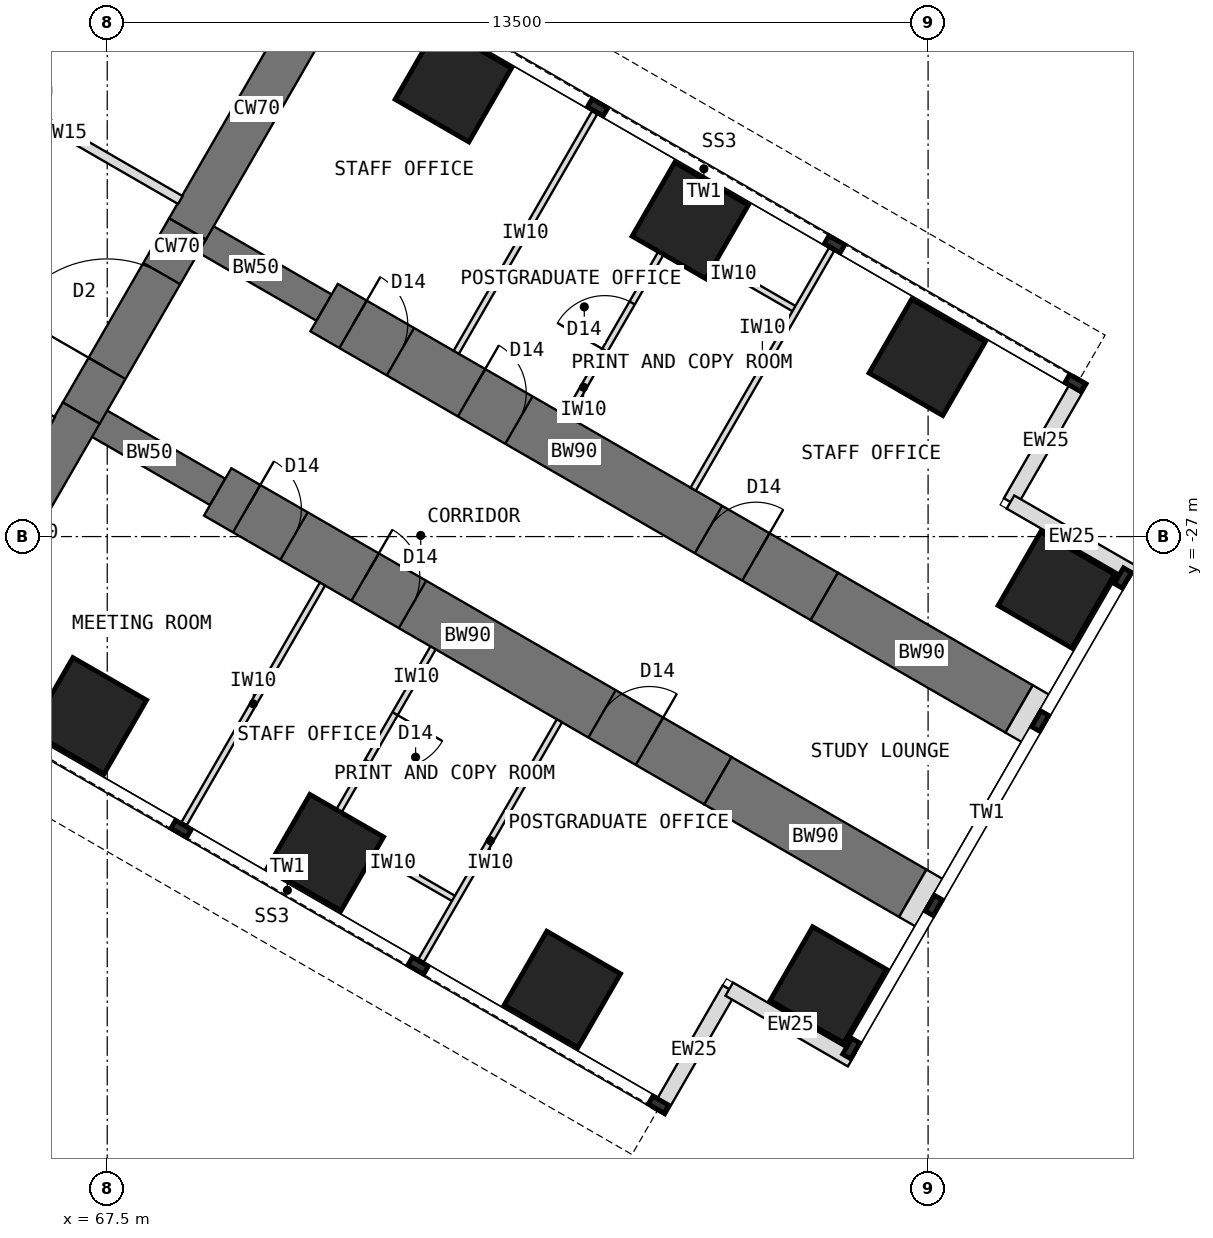
"""IFC4 building model, lengths in metres.
Left out: names, types, materials, properties, quantities, classifications, styles, units other than length and angle.
Written with IfcOpenShell. Run it as: python <this file> out.ifc"""

import sys

from ifc_helpers import new_model, si_unit, direction, frame, frame_2d, origin, origin_2d, place, context, subcontext, project, spatial, rectangle, extrude, element, fill, save


model = new_model("IFC4")
c1 = context("Model", 3, precision=1e-05, world=origin(), true_north=direction((0.0, 1.0)))
c2 = subcontext(c1, "Body", "Model", "MODEL_VIEW")
j1 = project(units=[si_unit("LENGTHUNIT", "METRE"), si_unit("PLANEANGLEUNIT", "RADIAN")], contexts=[c1])
p1 = place(None, origin())
s1 = spatial("IfcSite", under=j1, at=p1, CompositionType="ELEMENT")
p2 = place(p1, origin())
s2 = spatial("IfcBuilding", under=s1, at=p2, CompositionType="ELEMENT")
p3 = place(p2, frame((0.0, 0.0, 84.5)))
s3 = spatial("IfcBuildingStorey", under=s2, at=p3, CompositionType="ELEMENT", Elevation=84.5)
p4 = place(p3, frame((64.798, -28.908, 0.0), z_axis=(0.0, 0.0, 1.0), x_axis=(0.499984222037, 0.866034513004, 0.0)))
e1 = element("IfcWall", 1, at=p4, inside=s3, PredefinedType="SHEAR", context=c2, shape_type="SweptSolid", body=[
    extrude(rectangle(XDim=4.548, YDim=0.7, at=frame_2d((2.274, 0.0))), origin(), (0.0, 0.0, 1.0), 4.0),
])
p5 = place(p3, frame((67.072, -24.97, 0.0), z_axis=(0.0, 0.0, 1.0), x_axis=(0.500010275428, 0.866019471182, 0.0)))
e2 = element("IfcWall", 2, at=p5, inside=s3, PredefinedType="SHEAR", context=c2, shape_type="SweptSolid", body=[
    extrude(rectangle(XDim=3.5, YDim=0.7, at=frame_2d((1.75, 0.0))), origin(), (0.0, 0.0, 1.0), 4.0),
])
p6 = place(p5, frame((0.85, 0.0, 0.0)))
e3 = element("IfcOpeningElement", 3, at=p6, cuts=e2, PredefinedType="OPENING", context=c2, shape_type="SweptSolid", body=[
    extrude(rectangle(XDim=1.8, YDim=2.1, at=frame_2d((0.9, 1.05))), frame((0.0, 0.36, 0.0), z_axis=(0.0, -1.0, 0.0), x_axis=(1.0, 0.0, 0.0)), (0.0, 0.0, 1.0), 0.72),
])
p7 = place(p3, frame((68.822, -21.939, 0.0), z_axis=(0.0, 0.0, 1.0), x_axis=(0.500024481964, 0.866011268655, 0.0)))
e4 = element("IfcWall", 4, at=p7, inside=s3, PredefinedType="SHEAR", context=c2, shape_type="SweptSolid", body=[
    extrude(rectangle(XDim=4.548, YDim=0.7, at=frame_2d((2.274, 0.0))), origin(), (0.0, 0.0, 1.0), 4.0),
])
p8 = place(p3, frame((68.822, -21.939, 0.0), z_axis=(0.0, 0.0, 1.0), x_axis=(0.866072649678, -0.499918158782, 0.0)))
e5 = element("IfcWall", 5, at=p8, inside=s3, PredefinedType="SHEAR", context=c2, shape_type="SweptSolid", body=[
    extrude(rectangle(XDim=2.592, YDim=0.5, at=frame_2d((1.296, 0.0))), origin(), (0.0, 0.0, 1.0), 4.0),
])
p9 = place(p3, frame((71.066, -23.234, 0.0), z_axis=(0.0, 0.0, 1.0), x_axis=(0.86602681393, -0.499997557548, 0.0)))
e6 = element("IfcWall", 6, at=p9, inside=s3, PredefinedType="SHEAR", context=c2, shape_type="SweptSolid", body=[
    extrude(rectangle(XDim=9.5, YDim=0.9, at=frame_2d((4.75, 0.0))), origin(), (0.0, 0.0, 1.0), 4.0),
])
p10 = place(p9, frame((0.55, 0.0, 0.0)))
e7 = element("IfcOpeningElement", 7, at=p10, cuts=e6, PredefinedType="OPENING", context=c2, shape_type="SweptSolid", body=[
    extrude(rectangle(XDim=0.9, YDim=2.1, at=frame_2d((0.45, 1.05))), frame((0.0, 0.46, 0.0), z_axis=(0.0, -1.0, 0.0), x_axis=(1.0, 0.0, 0.0)), (0.0, 0.0, 1.0), 0.92),
])
p11 = place(p9, frame((2.8, 0.0, 0.0)))
e8 = element("IfcOpeningElement", 8, at=p11, cuts=e6, PredefinedType="OPENING", context=c2, shape_type="SweptSolid", body=[
    extrude(rectangle(XDim=0.9, YDim=2.1, at=frame_2d((0.45, 1.05))), frame((0.0, 0.46, 0.0), z_axis=(0.0, -1.0, 0.0), x_axis=(1.0, 0.0, 0.0)), (0.0, 0.0, 1.0), 0.92),
])
p12 = place(p9, frame((7.3, 0.0, 0.0)))
e9 = element("IfcOpeningElement", 9, at=p12, cuts=e6, PredefinedType="OPENING", context=c2, shape_type="SweptSolid", body=[
    extrude(rectangle(XDim=0.9, YDim=2.1, at=frame_2d((0.45, 1.05))), frame((0.0, 0.46, 0.0), z_axis=(0.0, -1.0, 0.0), x_axis=(1.0, 0.0, 0.0)), (0.0, 0.0, 1.0), 0.92),
])
p13 = place(p3, frame((79.294, -27.984, 0.0), z_axis=(0.0, 0.0, 1.0), x_axis=(0.866000971088, -0.500042316284, 0.0)))
e10 = element("IfcWall", 10, at=p13, inside=s3, PredefinedType="SHEAR", context=c2, shape_type="SweptSolid", body=[
    extrude(rectangle(XDim=3.7, YDim=0.9, at=frame_2d((1.85, 0.0))), origin(), (0.0, 0.0, 1.0), 4.0),
])
p14 = place(p3, frame((67.072, -24.97, 0.0), z_axis=(0.0, 0.0, 1.0), x_axis=(0.866031863473, -0.499988811324, 0.0)))
e11 = element("IfcWall", 11, at=p14, inside=s3, PredefinedType="SHEAR", context=c2, shape_type="SweptSolid", body=[
    extrude(rectangle(XDim=2.592, YDim=0.5, at=frame_2d((1.296, 0.0))), origin(), (0.0, 0.0, 1.0), 4.0),
])
p15 = place(p3, frame((69.316, -26.266, 0.0), z_axis=(0.0, 0.0, 1.0), x_axis=(0.86602681393, -0.499997557548, 0.0)))
e12 = element("IfcWall", 12, at=p15, inside=s3, PredefinedType="SHEAR", context=c2, shape_type="SweptSolid", body=[
    extrude(rectangle(XDim=9.5, YDim=0.9, at=frame_2d((4.75, 0.0))), origin(), (0.0, 0.0, 1.0), 4.0),
])
p16 = place(p15, frame((0.55, 0.0, 0.0)))
e13 = element("IfcOpeningElement", 13, at=p16, cuts=e12, PredefinedType="OPENING", context=c2, shape_type="SweptSolid", body=[
    extrude(rectangle(XDim=0.9, YDim=2.1, at=frame_2d((0.45, 1.05))), frame((0.0, 0.46, 0.0), z_axis=(0.0, -1.0, 0.0), x_axis=(1.0, 0.0, 0.0)), (0.0, 0.0, 1.0), 0.92),
])
p17 = place(p15, frame((2.8, 0.0, 0.0)))
e14 = element("IfcOpeningElement", 14, at=p17, cuts=e12, PredefinedType="OPENING", context=c2, shape_type="SweptSolid", body=[
    extrude(rectangle(XDim=0.9, YDim=2.1, at=frame_2d((0.45, 1.05))), frame((0.0, 0.46, 0.0), z_axis=(0.0, -1.0, 0.0), x_axis=(1.0, 0.0, 0.0)), (0.0, 0.0, 1.0), 0.92),
])
p18 = place(p15, frame((7.3, 0.0, 0.0)))
e15 = element("IfcOpeningElement", 15, at=p18, cuts=e12, PredefinedType="OPENING", context=c2, shape_type="SweptSolid", body=[
    extrude(rectangle(XDim=0.9, YDim=2.1, at=frame_2d((0.45, 1.05))), frame((0.0, 0.46, 0.0), z_axis=(0.0, -1.0, 0.0), x_axis=(1.0, 0.0, 0.0)), (0.0, 0.0, 1.0), 0.92),
])
p19 = place(p3, frame((77.544, -31.016, 0.0), z_axis=(0.0, 0.0, 1.0), x_axis=(0.866029545028, -0.499992827086, 0.0)))
e16 = element("IfcWall", 16, at=p19, inside=s3, PredefinedType="SHEAR", context=c2, shape_type="SweptSolid", body=[
    extrude(rectangle(XDim=3.7, YDim=0.9, at=frame_2d((1.85, 0.0))), origin(), (0.0, 0.0, 1.0), 4.0),
])
for number, where, z_axis, x_axis in (
    (17, (73.191, -19.554, 0.0), (0.0, 0.0, 1.0), (0.5, 0.866, 0.0)),
    (18, (67.191, -29.946, 0.0), (0.0, 0.0, 1.0), (0.5, 0.866, 0.0)),
    (19, (77.088, -21.804, 0.0), (0.0, 0.0, 1.0), (0.5, 0.866, 0.0)),
    (20, (71.088, -32.196, 0.0), (0.0, 0.0, 1.0), (0.5, 0.866, 0.0)),
    (21, (80.986, -24.054, 0.0), (0.0, 0.0, 1.0), (0.5, 0.866, 0.0)),
    (22, (74.986, -34.446, 0.0), (0.0, 0.0, 1.0), (0.5, 0.866, 0.0)),
    (23, (83.108, -27.877, 0.0), (0.0, 0.0, 1.0), (0.5, 0.866, 0.0)),
    (24, (79.358, -34.373, 0.0), (0.0, 0.0, 1.0), (0.5, 0.866, 0.0)),
):
    element("IfcColumn", number, at=place(p3, frame(where, z_axis=z_axis, x_axis=x_axis)), inside=s3, PredefinedType="COLUMN", context=c2, shape_type="SweptSolid", body=[
        extrude(rectangle(XDim=1.4, YDim=1.4, at=origin_2d()), origin(), (0.0, 0.0, 1.0), 4.0),
    ])
for number, where, z_axis, x_axis in (
    (25, (83.517, -24.419, 0.0), (0.0, 0.0, 1.0), (-0.5, -0.866, 0.0)),
    (26, (82.355, -26.432, 0.0), (0.0, 0.0, 1.0), (0.866, -0.5, 0.0)),
    (27, (76.567, -36.456, 0.0), (0.0, 0.0, 1.0), (0.5, 0.866, 0.0)),
    (28, (77.73, -34.443, 0.0), (0.0, 0.0, 1.0), (0.866, -0.5, 0.0)),
):
    element("IfcWall", number, at=place(p3, frame(where, z_axis=z_axis, x_axis=x_axis)), inside=s3, PredefinedType="STANDARD", context=c2, shape_type="SweptSolid", body=[
        extrude(rectangle(XDim=2.325, YDim=0.25, at=frame_2d((1.163, 0.0))), origin(), (0.0, 0.0, 1.0), 3.8),
    ])
for number, where, z_axis, x_axis in (
    (29, (82.498, -29.834, 0.0), (0.0, 0.0, 1.0), (0.866, -0.5, 0.0)),
    (30, (80.748, -32.865, 0.0), (0.0, 0.0, 1.0), (0.866, -0.5, 0.0)),
):
    element("IfcWall", number, at=place(p3, frame(where, z_axis=z_axis, x_axis=x_axis)), inside=s3, PredefinedType="PARTITIONING", context=c2, shape_type="SweptSolid", body=[
        extrude(rectangle(XDim=0.31, YDim=0.9, at=frame_2d((0.155, 0.0))), origin(), (0.0, 0.0, 1.0), 3.8),
    ])
p20 = place(p3, frame((64.62, -19.201, 0.0), z_axis=(0.0, 0.0, 1.0), x_axis=(0.866023886965, 0.500002627198, 0.0)))
e31 = element("IfcWall", 31, at=p20, inside=s3, PredefinedType="SHEAR", context=c2, shape_type="SweptSolid", body=[
    extrude(rectangle(XDim=5.858, YDim=0.4, at=frame_2d((2.929, 0.0))), origin(), (0.0, 0.0, 1.0), 4.0),
])
for number, where, z_axis, x_axis in (
    (32, (73.24, -23.97, 0.0), (0.0, 0.0, 1.0), (0.5, 0.866, 0.0)),
    (33, (77.137, -26.22, 0.0), (0.0, 0.0, 1.0), (0.5, 0.866, 0.0)),
):
    element("IfcWall", number, at=place(p3, frame(where, z_axis=z_axis, x_axis=x_axis)), inside=s3, PredefinedType="PARTITIONING", context=c2, shape_type="SweptSolid", body=[
        extrude(rectangle(XDim=4.55, YDim=0.1, at=frame_2d((2.275, 0.0))), origin(), (0.0, 0.0, 1.0), 3.8),
    ])
p21 = place(p3, frame((76.759, -22.075, 0.0), z_axis=(0.0, 0.0, 1.0), x_axis=(0.866024647952, -0.500001309137, 0.0)))
e34 = element("IfcWall", 34, at=p21, inside=s3, PredefinedType="PARTITIONING", context=c2, shape_type="SweptSolid", body=[
    extrude(rectangle(XDim=2.4, YDim=0.1, at=frame_2d((1.2, 0.0))), origin(), (0.0, 0.0, 1.0), 3.8),
])
p22 = place(p3, frame((75.059, -25.02, 0.0), z_axis=(0.0, 0.0, 1.0), x_axis=(0.499977295307, 0.866038511948, 0.0)))
e35 = element("IfcWall", 35, at=p22, inside=s3, PredefinedType="PARTITIONING", context=c2, shape_type="SweptSolid", body=[
    extrude(rectangle(XDim=3.4, YDim=0.1, at=frame_2d((1.7, 0.0))), origin(), (0.0, 0.0, 1.0), 3.8),
])
p23 = place(p22, frame((1.25, 0.0, 0.0)))
e36 = element("IfcOpeningElement", 36, at=p23, cuts=e35, PredefinedType="OPENING", context=c2, shape_type="SweptSolid", body=[
    extrude(rectangle(XDim=0.9, YDim=2.1, at=frame_2d((0.45, 1.05))), frame((0.0, 0.06, 0.0), z_axis=(0.0, -1.0, 0.0), x_axis=(1.0, 0.0, 0.0)), (0.0, 0.0, 1.0), 0.12),
])
for number, where, z_axis, x_axis in (
    (37, (71.04, -27.78, 0.0), (0.0, 0.0, 1.0), (-0.5, -0.866, 0.0)),
    (38, (74.937, -30.03, 0.0), (0.0, 0.0, 1.0), (-0.5, -0.866, 0.0)),
):
    element("IfcWall", number, at=place(p3, frame(where, z_axis=z_axis, x_axis=x_axis)), inside=s3, PredefinedType="PARTITIONING", context=c2, shape_type="SweptSolid", body=[
        extrude(rectangle(XDim=4.55, YDim=0.1, at=frame_2d((2.275, 0.0))), origin(), (0.0, 0.0, 1.0), 3.8),
    ])
p24 = place(p3, frame((71.158, -31.775, 0.0), z_axis=(0.0, 0.0, 1.0), x_axis=(0.866006032174, -0.500033551112, 0.0)))
e39 = element("IfcWall", 39, at=p24, inside=s3, PredefinedType="PARTITIONING", context=c2, shape_type="SweptSolid", body=[
    extrude(rectangle(XDim=2.4, YDim=0.1, at=frame_2d((1.2, 0.0))), origin(), (0.0, 0.0, 1.0), 3.8),
])
p25 = place(p3, frame((72.859, -28.83, 0.0), z_axis=(0.0, 0.0, 1.0), x_axis=(-0.500062241894, -0.865989465428, 0.0)))
e40 = element("IfcWall", 40, at=p25, inside=s3, PredefinedType="PARTITIONING", context=c2, shape_type="SweptSolid", body=[
    extrude(rectangle(XDim=3.4, YDim=0.1, at=frame_2d((1.7, 0.0))), origin(), (0.0, 0.0, 1.0), 3.8),
])
p26 = place(p25, frame((1.25, 0.0, 0.0)))
e41 = element("IfcOpeningElement", 41, at=p26, cuts=e40, PredefinedType="OPENING", context=c2, shape_type="SweptSolid", body=[
    extrude(rectangle(XDim=0.9, YDim=2.1, at=frame_2d((0.45, 1.05))), frame((0.0, 0.06, 0.0), z_axis=(0.0, -1.0, 0.0), x_axis=(1.0, 0.0, 0.0)), (0.0, 0.0, 1.0), 0.12),
])
p27 = place(p3, frame((64.87, -19.253, 0.0), z_axis=(0.0, 0.0, 1.0), x_axis=(0.866021148949, -0.500007369519, 0.0)))
e42 = element("IfcWall", 42, at=p27, inside=s3, PredefinedType="PARTITIONING", context=c2, shape_type="SweptSolid", body=[
    extrude(rectangle(XDim=4.426, YDim=0.15, at=frame_2d((2.213, 0.0))), origin(), (0.0, 0.0, 1.0), 3.8),
])
p28 = place(p27, frame((0.828, 0.0, 0.0)))
e43 = element("IfcOpeningElement", 43, at=p28, cuts=e42, PredefinedType="OPENING", context=c2, shape_type="SweptSolid", body=[
    extrude(rectangle(XDim=1.0, YDim=2.1, at=frame_2d((0.5, 1.05))), frame((0.0, 0.085, 0.0), z_axis=(0.0, -1.0, 0.0), x_axis=(1.0, 0.0, 0.0)), (0.0, 0.0, 1.0), 0.17),
])
p29 = place(p3, frame((66.603, -25.103, 0.0), z_axis=(0.0, 0.0, 1.0), x_axis=(-0.866021148949, 0.500007369519, 0.0)))
e44 = element("IfcWall", 44, at=p29, inside=s3, PredefinedType="PARTITIONING", context=c2, shape_type="SweptSolid", body=[
    extrude(rectangle(XDim=4.426, YDim=0.15, at=frame_2d((2.213, 0.0))), origin(), (0.0, 0.0, 1.0), 3.8),
])
p30 = place(p29, frame((2.598, 0.0, 0.0)))
e45 = element("IfcOpeningElement", 45, at=p30, cuts=e44, PredefinedType="OPENING", context=c2, shape_type="SweptSolid", body=[
    extrude(rectangle(XDim=1.0, YDim=2.1, at=frame_2d((0.5, 1.05))), frame((0.0, 0.085, 0.0), z_axis=(0.0, -1.0, 0.0), x_axis=(1.0, 0.0, 0.0)), (0.0, 0.0, 1.0), 0.17),
])
p31 = place(p6, origin())
e46 = element("IfcDoor", 46, at=p31, inside=s3, OperationType="DOUBLE_DOOR_DOUBLE_SWING", PredefinedType="DOOR", context=c2, shape_type="SweptSolid", body=[
    extrude(rectangle(XDim=1.72, YDim=2.06, at=frame_2d((0.9, 1.03))), frame((0.0, 0.025, 0.0), z_axis=(0.0, -1.0, 0.0), x_axis=(1.0, 0.0, 0.0)), (0.0, 0.0, 1.0), 0.05),
    extrude(rectangle(XDim=0.04, YDim=2.1, at=frame_2d((0.02, 1.05))), frame((0.0, 0.35, 0.0), z_axis=(0.0, -1.0, 0.0), x_axis=(1.0, 0.0, 0.0)), (0.0, 0.0, 1.0), 0.699),
    extrude(rectangle(XDim=0.04, YDim=2.1, at=frame_2d((1.78, 1.05))), frame((0.0, 0.35, 0.0), z_axis=(0.0, -1.0, 0.0), x_axis=(1.0, 0.0, 0.0)), (0.0, 0.0, 1.0), 0.699),
    extrude(rectangle(XDim=1.72, YDim=0.04, at=frame_2d((0.9, 2.08))), frame((0.0, 0.35, 0.0), z_axis=(0.0, -1.0, 0.0), x_axis=(1.0, 0.0, 0.0)), (0.0, 0.0, 1.0), 0.699),
])
fill(e3, e46)
p32 = place(p23, origin())
e47 = element("IfcDoor", 47, at=p32, inside=s3, OperationType="SINGLE_SWING_LEFT", PredefinedType="DOOR", context=c2, shape_type="SweptSolid", body=[
    extrude(rectangle(XDim=0.9, YDim=2.1, at=frame_2d((0.45, 1.05))), frame((0.0, 0.025, 0.0), z_axis=(0.0, -1.0, 0.0), x_axis=(1.0, 0.0, 0.0)), (0.0, 0.0, 1.0), 0.05),
])
fill(e36, e47)
p33 = place(p26, origin())
e48 = element("IfcDoor", 48, at=p33, inside=s3, OperationType="SINGLE_SWING_LEFT", PredefinedType="DOOR", context=c2, shape_type="SweptSolid", body=[
    extrude(rectangle(XDim=0.9, YDim=2.1, at=frame_2d((0.45, 1.05))), frame((0.0, 0.025, 0.0), z_axis=(0.0, -1.0, 0.0), x_axis=(1.0, 0.0, 0.0)), (0.0, 0.0, 1.0), 0.05),
])
fill(e41, e48)
p34 = place(p10, origin())
e49 = element("IfcDoor", 49, at=p34, inside=s3, OperationType="SINGLE_SWING_LEFT", PredefinedType="DOOR", context=c2, shape_type="SweptSolid", body=[
    extrude(rectangle(XDim=0.82, YDim=2.06, at=frame_2d((0.45, 1.03))), frame((0.0, 0.025, 0.0), z_axis=(0.0, -1.0, 0.0), x_axis=(1.0, 0.0, 0.0)), (0.0, 0.0, 1.0), 0.05),
    extrude(rectangle(XDim=0.04, YDim=2.1, at=frame_2d((0.02, 1.05))), frame((0.0, 0.45, 0.0), z_axis=(0.0, -1.0, 0.0), x_axis=(1.0, 0.0, 0.0)), (0.0, 0.0, 1.0), 0.899),
    extrude(rectangle(XDim=0.04, YDim=2.1, at=frame_2d((0.88, 1.05))), frame((0.0, 0.45, 0.0), z_axis=(0.0, -1.0, 0.0), x_axis=(1.0, 0.0, 0.0)), (0.0, 0.0, 1.0), 0.899),
    extrude(rectangle(XDim=0.82, YDim=0.04, at=frame_2d((0.45, 2.08))), frame((0.0, 0.45, 0.0), z_axis=(0.0, -1.0, 0.0), x_axis=(1.0, 0.0, 0.0)), (0.0, 0.0, 1.0), 0.899),
])
fill(e7, e49)
p35 = place(p11, origin())
e50 = element("IfcDoor", 50, at=p35, inside=s3, OperationType="SINGLE_SWING_LEFT", PredefinedType="DOOR", context=c2, shape_type="SweptSolid", body=[
    extrude(rectangle(XDim=0.82, YDim=2.06, at=frame_2d((0.45, 1.03))), frame((0.0, 0.025, 0.0), z_axis=(0.0, -1.0, 0.0), x_axis=(1.0, 0.0, 0.0)), (0.0, 0.0, 1.0), 0.05),
    extrude(rectangle(XDim=0.04, YDim=2.1, at=frame_2d((0.02, 1.05))), frame((0.0, 0.45, 0.0), z_axis=(0.0, -1.0, 0.0), x_axis=(1.0, 0.0, 0.0)), (0.0, 0.0, 1.0), 0.899),
    extrude(rectangle(XDim=0.04, YDim=2.1, at=frame_2d((0.88, 1.05))), frame((0.0, 0.45, 0.0), z_axis=(0.0, -1.0, 0.0), x_axis=(1.0, 0.0, 0.0)), (0.0, 0.0, 1.0), 0.899),
    extrude(rectangle(XDim=0.82, YDim=0.04, at=frame_2d((0.45, 2.08))), frame((0.0, 0.45, 0.0), z_axis=(0.0, -1.0, 0.0), x_axis=(1.0, 0.0, 0.0)), (0.0, 0.0, 1.0), 0.899),
])
fill(e8, e50)
p36 = place(p12, origin())
e51 = element("IfcDoor", 51, at=p36, inside=s3, OperationType="SINGLE_SWING_RIGHT", PredefinedType="DOOR", context=c2, shape_type="SweptSolid", body=[
    extrude(rectangle(XDim=0.82, YDim=2.06, at=frame_2d((0.45, 1.03))), frame((0.0, 0.025, 0.0), z_axis=(0.0, -1.0, 0.0), x_axis=(1.0, 0.0, 0.0)), (0.0, 0.0, 1.0), 0.05),
    extrude(rectangle(XDim=0.04, YDim=2.1, at=frame_2d((0.02, 1.05))), frame((0.0, 0.45, 0.0), z_axis=(0.0, -1.0, 0.0), x_axis=(1.0, 0.0, 0.0)), (0.0, 0.0, 1.0), 0.899),
    extrude(rectangle(XDim=0.04, YDim=2.1, at=frame_2d((0.88, 1.05))), frame((0.0, 0.45, 0.0), z_axis=(0.0, -1.0, 0.0), x_axis=(1.0, 0.0, 0.0)), (0.0, 0.0, 1.0), 0.899),
    extrude(rectangle(XDim=0.82, YDim=0.04, at=frame_2d((0.45, 2.08))), frame((0.0, 0.45, 0.0), z_axis=(0.0, -1.0, 0.0), x_axis=(1.0, 0.0, 0.0)), (0.0, 0.0, 1.0), 0.899),
])
fill(e9, e51)
p37 = place(p16, origin())
e52 = element("IfcDoor", 52, at=p37, inside=s3, OperationType="SINGLE_SWING_LEFT", PredefinedType="DOOR", context=c2, shape_type="SweptSolid", body=[
    extrude(rectangle(XDim=0.82, YDim=2.06, at=frame_2d((0.45, 1.03))), frame((0.0, 0.025, 0.0), z_axis=(0.0, -1.0, 0.0), x_axis=(1.0, 0.0, 0.0)), (0.0, 0.0, 1.0), 0.05),
    extrude(rectangle(XDim=0.04, YDim=2.1, at=frame_2d((0.02, 1.05))), frame((0.0, 0.45, 0.0), z_axis=(0.0, -1.0, 0.0), x_axis=(1.0, 0.0, 0.0)), (0.0, 0.0, 1.0), 0.899),
    extrude(rectangle(XDim=0.04, YDim=2.1, at=frame_2d((0.88, 1.05))), frame((0.0, 0.45, 0.0), z_axis=(0.0, -1.0, 0.0), x_axis=(1.0, 0.0, 0.0)), (0.0, 0.0, 1.0), 0.899),
    extrude(rectangle(XDim=0.82, YDim=0.04, at=frame_2d((0.45, 2.08))), frame((0.0, 0.45, 0.0), z_axis=(0.0, -1.0, 0.0), x_axis=(1.0, 0.0, 0.0)), (0.0, 0.0, 1.0), 0.899),
])
fill(e13, e52)
p38 = place(p17, origin())
e53 = element("IfcDoor", 53, at=p38, inside=s3, OperationType="SINGLE_SWING_LEFT", PredefinedType="DOOR", context=c2, shape_type="SweptSolid", body=[
    extrude(rectangle(XDim=0.82, YDim=2.06, at=frame_2d((0.45, 1.03))), frame((0.0, 0.025, 0.0), z_axis=(0.0, -1.0, 0.0), x_axis=(1.0, 0.0, 0.0)), (0.0, 0.0, 1.0), 0.05),
    extrude(rectangle(XDim=0.04, YDim=2.1, at=frame_2d((0.02, 1.05))), frame((0.0, 0.45, 0.0), z_axis=(0.0, -1.0, 0.0), x_axis=(1.0, 0.0, 0.0)), (0.0, 0.0, 1.0), 0.899),
    extrude(rectangle(XDim=0.04, YDim=2.1, at=frame_2d((0.88, 1.05))), frame((0.0, 0.45, 0.0), z_axis=(0.0, -1.0, 0.0), x_axis=(1.0, 0.0, 0.0)), (0.0, 0.0, 1.0), 0.899),
    extrude(rectangle(XDim=0.82, YDim=0.04, at=frame_2d((0.45, 2.08))), frame((0.0, 0.45, 0.0), z_axis=(0.0, -1.0, 0.0), x_axis=(1.0, 0.0, 0.0)), (0.0, 0.0, 1.0), 0.899),
])
fill(e14, e53)
p39 = place(p18, origin())
e54 = element("IfcDoor", 54, at=p39, inside=s3, OperationType="SINGLE_SWING_RIGHT", PredefinedType="DOOR", context=c2, shape_type="SweptSolid", body=[
    extrude(rectangle(XDim=0.82, YDim=2.06, at=frame_2d((0.45, 1.03))), frame((0.0, 0.025, 0.0), z_axis=(0.0, -1.0, 0.0), x_axis=(1.0, 0.0, 0.0)), (0.0, 0.0, 1.0), 0.05),
    extrude(rectangle(XDim=0.04, YDim=2.1, at=frame_2d((0.02, 1.05))), frame((0.0, 0.45, 0.0), z_axis=(0.0, -1.0, 0.0), x_axis=(1.0, 0.0, 0.0)), (0.0, 0.0, 1.0), 0.899),
    extrude(rectangle(XDim=0.04, YDim=2.1, at=frame_2d((0.88, 1.05))), frame((0.0, 0.45, 0.0), z_axis=(0.0, -1.0, 0.0), x_axis=(1.0, 0.0, 0.0)), (0.0, 0.0, 1.0), 0.899),
    extrude(rectangle(XDim=0.82, YDim=0.04, at=frame_2d((0.45, 2.08))), frame((0.0, 0.45, 0.0), z_axis=(0.0, -1.0, 0.0), x_axis=(1.0, 0.0, 0.0)), (0.0, 0.0, 1.0), 0.899),
])
fill(e15, e54)
save(model, sys.argv[1])
